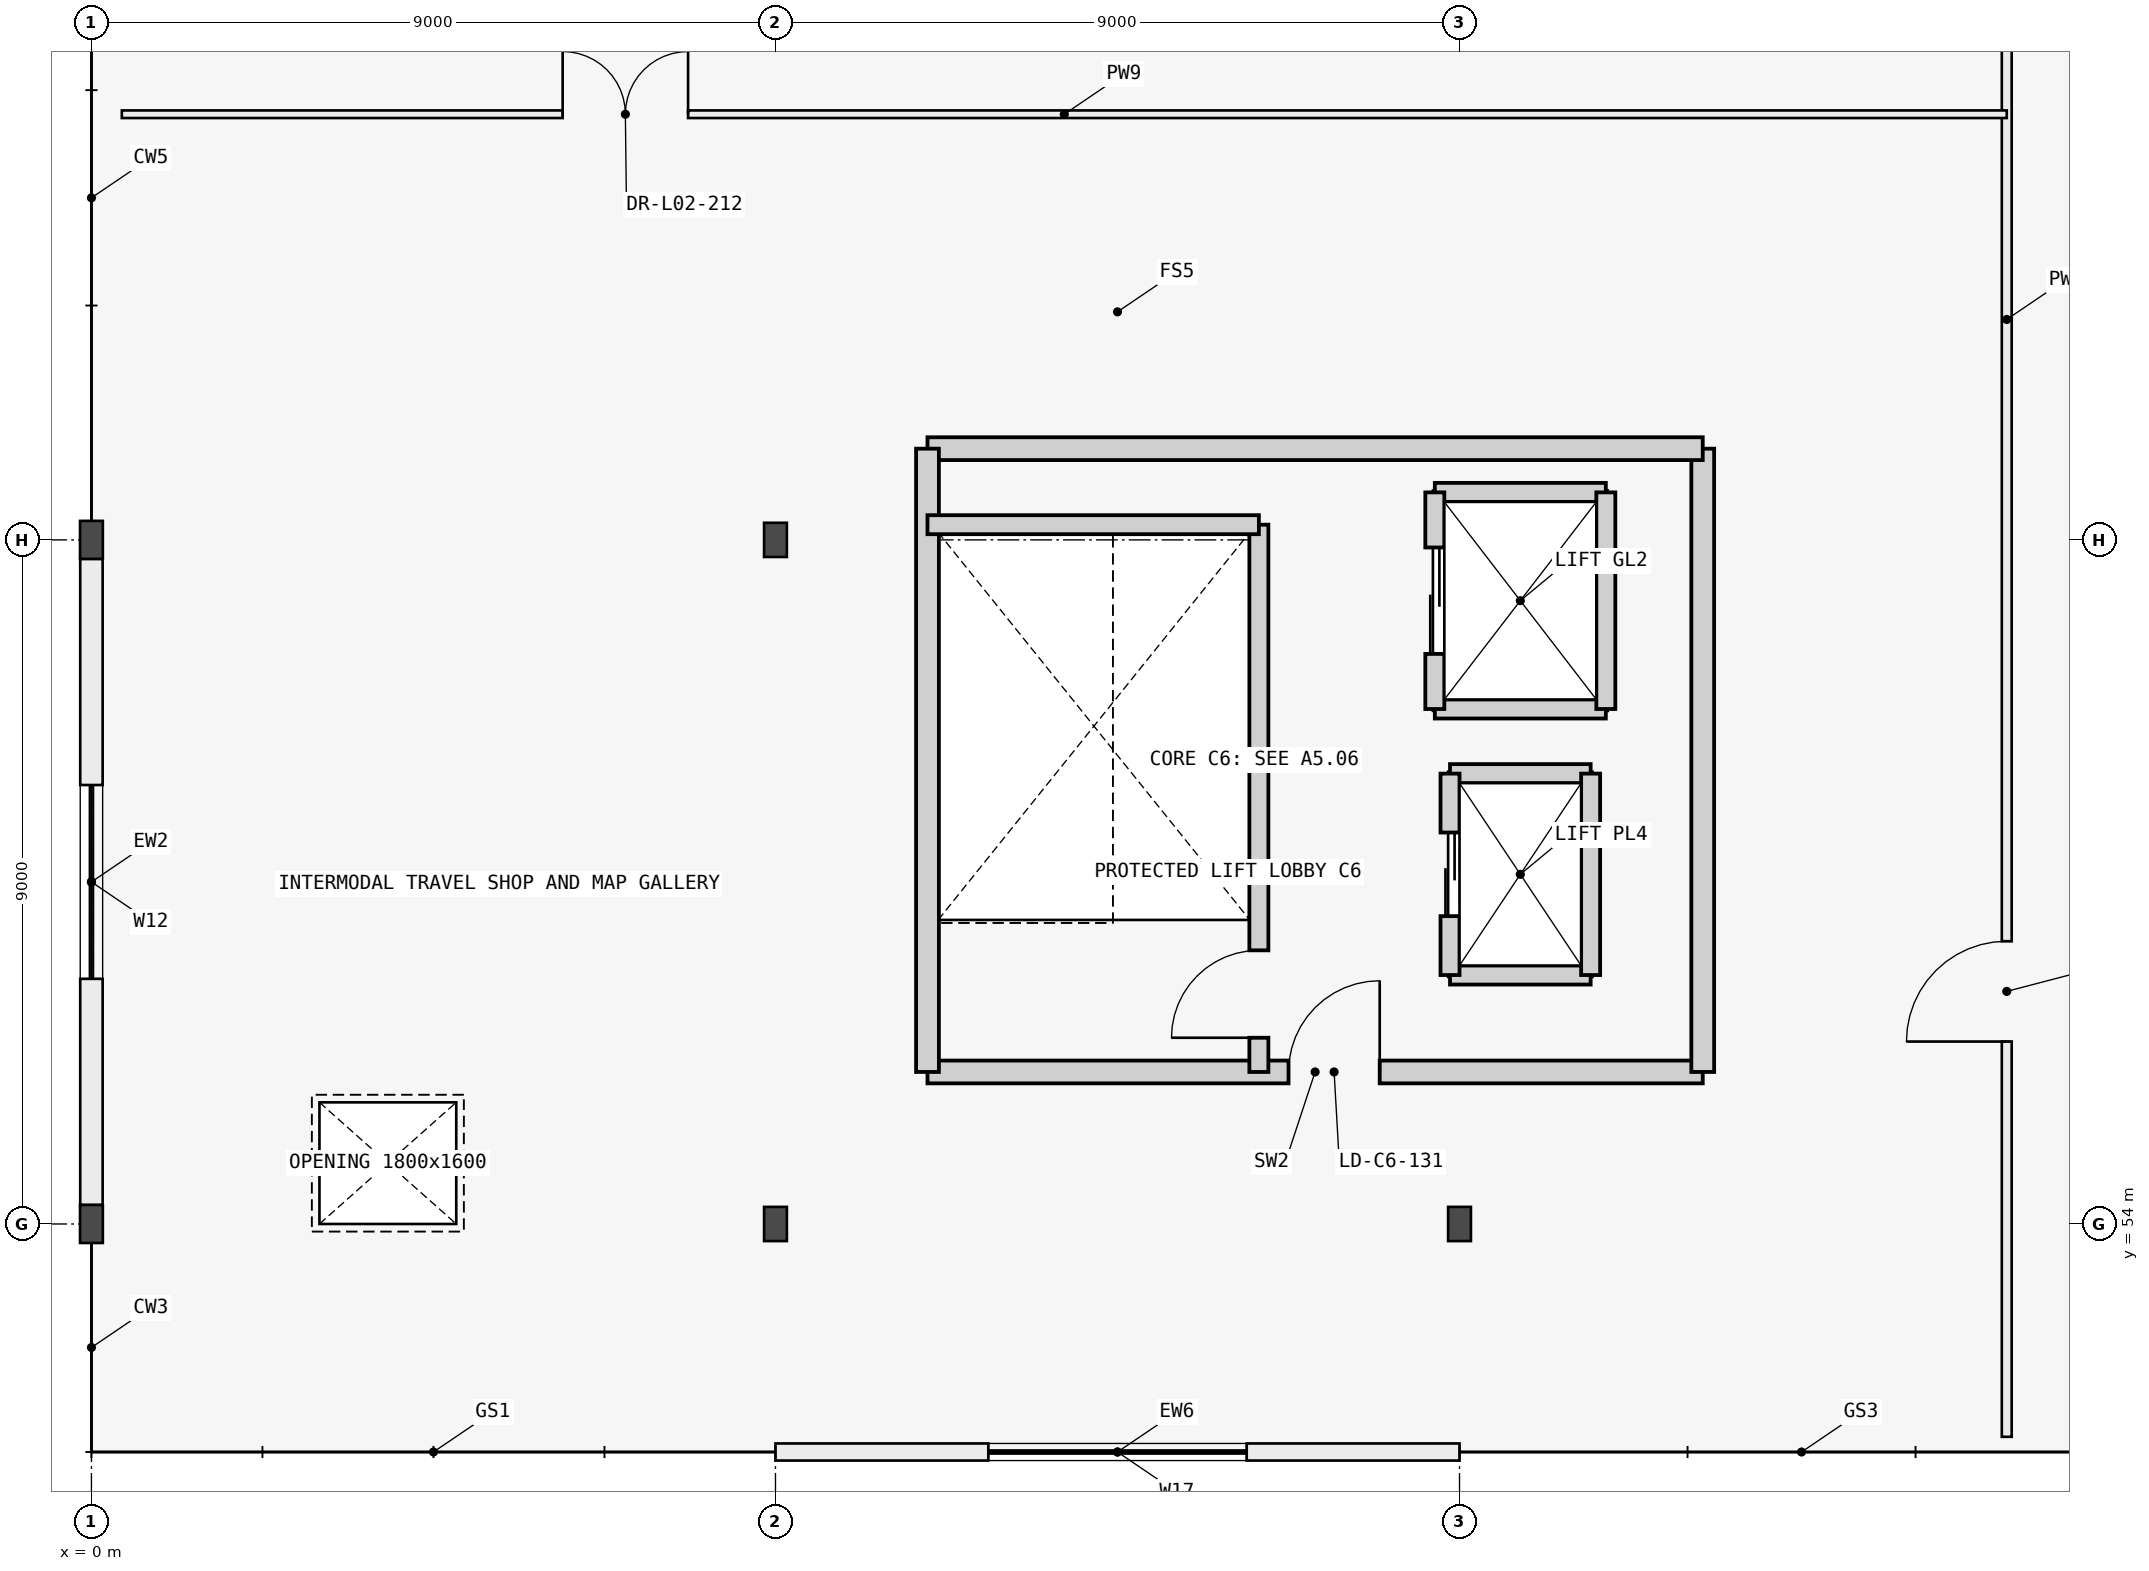
"""IFC4 building model, lengths in metres.
Left out: names, types, materials, properties, quantities, classifications, styles, units other than length and angle.
Written with IfcOpenShell. Run it as: python <this file> out.ifc"""

import sys

from ifc_helpers import new_model, si_unit, direction, frame, frame_2d, origin, origin_2d, place, context, subcontext, project, spatial, rectangle, i_section, extrude, element, fill, save


model = new_model("IFC4")
c1 = context("Model", 3, precision=1e-05, world=origin(), true_north=direction((0.0, 1.0)))
c2 = subcontext(c1, "Body", "Model", "MODEL_VIEW")
j1 = project(units=[si_unit("LENGTHUNIT", "METRE"), si_unit("PLANEANGLEUNIT", "RADIAN")], contexts=[c1])
p1 = place(None, origin())
s1 = spatial("IfcSite", under=j1, at=p1, CompositionType="ELEMENT")
p2 = place(p1, origin())
s2 = spatial("IfcBuilding", under=s1, at=p2, CompositionType="ELEMENT")
p3 = place(p2, frame((0.0, 0.0, 8.4)))
s3 = spatial("IfcBuildingStorey", under=s2, at=p3, CompositionType="ELEMENT", Elevation=8.4)
p4 = place(p3, frame((0.0, 54.0, 0.0), z_axis=(0.0, 0.0, 1.0), x_axis=(1.0, 0.0, 0.0)))
e1 = element("IfcColumn", 1, at=p4, inside=s3, PredefinedType="COLUMN", context=c2, shape_type="SweptSolid", body=[
    extrude(i_section(OverallWidth=0.3, OverallDepth=0.5, WebThickness=0.014, FlangeThickness=0.028, FilletRadius=0.027, at=origin_2d()), origin(), (0.0, 0.0, 1.0), 4.2),
])
for number, where, z_axis, x_axis in (
    (2, (9.0, 54.0, 0.0), (0.0, 0.0, 1.0), (1.0, 0.0, 0.0)),
    (3, (18.0, 54.0, 0.0), (0.0, 0.0, 1.0), (1.0, 0.0, 0.0)),
):
    element("IfcColumn", number, at=place(p3, frame(where, z_axis=z_axis, x_axis=x_axis)), inside=s3, PredefinedType="COLUMN", context=c2, shape_type="SweptSolid", body=[
        extrude(i_section(OverallWidth=0.3, OverallDepth=0.45, WebThickness=0.014, FlangeThickness=0.026, FilletRadius=0.027, at=origin_2d()), origin(), (0.0, 0.0, 1.0), 4.2),
    ])
p5 = place(p3, frame((0.0, 63.0, 0.0), z_axis=(0.0, 0.0, 1.0), x_axis=(1.0, 0.0, 0.0)))
e4 = element("IfcColumn", 4, at=p5, inside=s3, PredefinedType="COLUMN", context=c2, shape_type="SweptSolid", body=[
    extrude(i_section(OverallWidth=0.3, OverallDepth=0.5, WebThickness=0.014, FlangeThickness=0.028, FilletRadius=0.027, at=origin_2d()), origin(), (0.0, 0.0, 1.0), 4.2),
])
p6 = place(p3, frame((9.0, 63.0, 0.0), z_axis=(0.0, 0.0, 1.0), x_axis=(1.0, 0.0, 0.0)))
e5 = element("IfcColumn", 5, at=p6, inside=s3, PredefinedType="COLUMN", context=c2, shape_type="SweptSolid", body=[
    extrude(i_section(OverallWidth=0.3, OverallDepth=0.45, WebThickness=0.014, FlangeThickness=0.026, FilletRadius=0.027, at=origin_2d()), origin(), (0.0, 0.0, 1.0), 4.2),
])
p7 = place(p3, frame((0.0, 54.25, 0.0), z_axis=(0.0, 0.0, 1.0), x_axis=(0.0, 1.0, 0.0)))
e6 = element("IfcWall", 6, at=p7, inside=s3, PredefinedType="STANDARD", context=c2, shape_type="SweptSolid", body=[
    extrude(rectangle(XDim=8.5, YDim=0.295, at=frame_2d((4.25, 0.0))), origin(), (0.0, 0.0, 1.0), 3.935),
])
p8 = place(p7, frame((2.975, 0.0, 0.95)))
e7 = element("IfcOpeningElement", 7, at=p8, cuts=e6, PredefinedType="OPENING", context=c2, shape_type="SweptSolid", body=[
    extrude(rectangle(XDim=2.55, YDim=1.5, at=frame_2d((1.275, 0.75))), frame((0.0, 0.157, 0.0), z_axis=(0.0, -1.0, 0.0), x_axis=(1.0, 0.0, 0.0)), (0.0, 0.0, 1.0), 0.315),
])
p9 = place(p3, frame((9.0, 51.0, 0.0), z_axis=(0.0, 0.0, 1.0), x_axis=(1.0, 0.0, 0.0)))
e8 = element("IfcWall", 8, at=p9, inside=s3, PredefinedType="STANDARD", context=c2, shape_type="SweptSolid", body=[
    extrude(rectangle(XDim=9.0, YDim=0.225, at=frame_2d((4.5, 0.0))), origin(), (0.0, 0.0, 1.0), 3.935),
])
p10 = place(p9, frame((2.8, 0.0, 0.95)))
e9 = element("IfcOpeningElement", 9, at=p10, cuts=e8, PredefinedType="OPENING", context=c2, shape_type="SweptSolid", body=[
    extrude(rectangle(XDim=3.4, YDim=1.55, at=frame_2d((1.7, 0.775))), frame((0.0, 0.123, 0.0), z_axis=(0.0, -1.0, 0.0), x_axis=(1.0, 0.0, 0.0)), (0.0, 0.0, 1.0), 0.245),
])
p11 = place(p3, frame((11.0, 56.0, 0.0), z_axis=(0.0, 0.0, 1.0), x_axis=(1.0, 0.0, 0.0)))
e10 = element("IfcWall", 10, at=p11, inside=s3, PredefinedType="SHEAR", context=c2, shape_type="SweptSolid", body=[
    extrude(rectangle(XDim=10.2, YDim=0.3, at=frame_2d((5.1, 0.0))), origin(), (0.0, 0.0, 1.0), 3.935),
])
p12 = place(p11, frame((4.75, 0.0, 0.0)))
e11 = element("IfcOpeningElement", 11, at=p12, cuts=e10, PredefinedType="OPENING", context=c2, shape_type="SweptSolid", body=[
    extrude(rectangle(XDim=1.2, YDim=2.15, at=frame_2d((0.6, 1.075))), frame((0.0, 0.16, 0.0), z_axis=(0.0, -1.0, 0.0), x_axis=(1.0, 0.0, 0.0)), (0.0, 0.0, 1.0), 0.32),
])
p13 = place(p3, frame((21.2, 56.0, 0.0), z_axis=(0.0, 0.0, 1.0), x_axis=(0.0, 1.0, 0.0)))
e12 = element("IfcWall", 12, at=p13, inside=s3, PredefinedType="SHEAR", context=c2, shape_type="SweptSolid", body=[
    extrude(rectangle(XDim=8.2, YDim=0.3, at=frame_2d((4.1, 0.0))), origin(), (0.0, 0.0, 1.0), 3.935),
])
p14 = place(p3, frame((21.2, 64.2, 0.0), z_axis=(0.0, 0.0, 1.0), x_axis=(-1.0, 0.0, 0.0)))
e13 = element("IfcWall", 13, at=p14, inside=s3, PredefinedType="SHEAR", context=c2, shape_type="SweptSolid", body=[
    extrude(rectangle(XDim=10.2, YDim=0.3, at=frame_2d((5.1, 0.0))), origin(), (0.0, 0.0, 1.0), 3.935),
])
p15 = place(p3, frame((11.0, 64.2, 0.0), z_axis=(0.0, 0.0, 1.0), x_axis=(0.0, -1.0, 0.0)))
e14 = element("IfcWall", 14, at=p15, inside=s3, PredefinedType="SHEAR", context=c2, shape_type="SweptSolid", body=[
    extrude(rectangle(XDim=8.2, YDim=0.3, at=frame_2d((4.1, 0.0))), origin(), (0.0, 0.0, 1.0), 3.935),
])
p16 = place(p3, frame((15.36, 56.0, 0.0), z_axis=(0.0, 0.0, 1.0), x_axis=(0.0, 1.0, 0.0)))
e15 = element("IfcWall", 15, at=p16, inside=s3, PredefinedType="SHEAR", context=c2, shape_type="SweptSolid", body=[
    extrude(rectangle(XDim=7.2, YDim=0.25, at=frame_2d((3.6, 0.0))), origin(), (0.0, 0.0, 1.0), 3.935),
])
p17 = place(p16, frame((0.45, 0.0, 0.0)))
e16 = element("IfcOpeningElement", 16, at=p17, cuts=e15, PredefinedType="OPENING", context=c2, shape_type="SweptSolid", body=[
    extrude(rectangle(XDim=1.15, YDim=2.15, at=frame_2d((0.575, 1.075))), frame((0.0, 0.135, 0.0), z_axis=(0.0, -1.0, 0.0), x_axis=(1.0, 0.0, 0.0)), (0.0, 0.0, 1.0), 0.27),
])
p18 = place(p3, frame((11.0, 63.2, 0.0), z_axis=(0.0, 0.0, 1.0), x_axis=(1.0, 0.0, 0.0)))
e17 = element("IfcWall", 17, at=p18, inside=s3, PredefinedType="SHEAR", context=c2, shape_type="SweptSolid", body=[
    extrude(rectangle(XDim=4.36, YDim=0.25, at=frame_2d((2.18, 0.0))), origin(), (0.0, 0.0, 1.0), 3.935),
])
for number, where, z_axis, x_axis in (
    (18, (17.875, 57.275, 0.0), (0.0, 0.0, 1.0), (1.0, 0.0, 0.0)),
    (19, (17.875, 59.925, 0.0), (0.0, 0.0, 1.0), (1.0, 0.0, 0.0)),
):
    element("IfcWall", number, at=place(p3, frame(where, z_axis=z_axis, x_axis=x_axis)), inside=s3, PredefinedType="SHEAR", context=c2, shape_type="SweptSolid", body=[
        extrude(rectangle(XDim=1.85, YDim=0.25, at=frame_2d((0.925, 0.0))), origin(), (0.0, 0.0, 1.0), 3.935),
    ])
p19 = place(p3, frame((19.725, 57.275, 0.0), z_axis=(0.0, 0.0, 1.0), x_axis=(0.0, 1.0, 0.0)))
e20 = element("IfcWall", 20, at=p19, inside=s3, PredefinedType="SHEAR", context=c2, shape_type="SweptSolid", body=[
    extrude(rectangle(XDim=2.65, YDim=0.25, at=frame_2d((1.325, 0.0))), origin(), (0.0, 0.0, 1.0), 3.935),
])
p20 = place(p3, frame((17.875, 57.275, 0.0), z_axis=(0.0, 0.0, 1.0), x_axis=(0.0, 1.0, 0.0)))
e21 = element("IfcWall", 21, at=p20, inside=s3, PredefinedType="SHEAR", context=c2, shape_type="SweptSolid", body=[
    extrude(rectangle(XDim=2.65, YDim=0.25, at=frame_2d((1.325, 0.0))), origin(), (0.0, 0.0, 1.0), 3.935),
])
p21 = place(p20, frame((0.775, 0.0, 0.0)))
e22 = element("IfcOpeningElement", 22, at=p21, cuts=e21, PredefinedType="OPENING", context=c2, shape_type="SweptSolid", body=[
    extrude(rectangle(XDim=1.1, YDim=2.15, at=frame_2d((0.55, 1.075))), frame((0.0, 0.135, 0.0), z_axis=(0.0, -1.0, 0.0), x_axis=(1.0, 0.0, 0.0)), (0.0, 0.0, 1.0), 0.27),
])
for number, where, z_axis, x_axis in (
    (23, (17.675, 60.775, 0.0), (0.0, 0.0, 1.0), (1.0, 0.0, 0.0)),
    (24, (17.675, 63.625, 0.0), (0.0, 0.0, 1.0), (1.0, 0.0, 0.0)),
):
    element("IfcWall", number, at=place(p3, frame(where, z_axis=z_axis, x_axis=x_axis)), inside=s3, PredefinedType="SHEAR", context=c2, shape_type="SweptSolid", body=[
        extrude(rectangle(XDim=2.25, YDim=0.25, at=frame_2d((1.125, 0.0))), origin(), (0.0, 0.0, 1.0), 3.935),
    ])
p22 = place(p3, frame((19.925, 60.775, 0.0), z_axis=(0.0, 0.0, 1.0), x_axis=(0.0, 1.0, 0.0)))
e25 = element("IfcWall", 25, at=p22, inside=s3, PredefinedType="SHEAR", context=c2, shape_type="SweptSolid", body=[
    extrude(rectangle(XDim=2.85, YDim=0.25, at=frame_2d((1.425, 0.0))), origin(), (0.0, 0.0, 1.0), 3.935),
])
p23 = place(p3, frame((17.675, 60.775, 0.0), z_axis=(0.0, 0.0, 1.0), x_axis=(0.0, 1.0, 0.0)))
e26 = element("IfcWall", 26, at=p23, inside=s3, PredefinedType="SHEAR", context=c2, shape_type="SweptSolid", body=[
    extrude(rectangle(XDim=2.85, YDim=0.25, at=frame_2d((1.425, 0.0))), origin(), (0.0, 0.0, 1.0), 3.935),
])
p24 = place(p23, frame((0.725, 0.0, 0.0)))
e27 = element("IfcOpeningElement", 27, at=p24, cuts=e26, PredefinedType="OPENING", context=c2, shape_type="SweptSolid", body=[
    extrude(rectangle(XDim=1.4, YDim=2.2, at=frame_2d((0.7, 1.1))), frame((0.0, 0.135, 0.0), z_axis=(0.0, -1.0, 0.0), x_axis=(1.0, 0.0, 0.0)), (0.0, 0.0, 1.0), 0.27),
])
p25 = place(p3, frame((25.2, 51.2, 0.0), z_axis=(0.0, 0.0, 1.0), x_axis=(0.0, 1.0, 0.0)))
e28 = element("IfcWall", 28, at=p25, inside=s3, PredefinedType="PARTITIONING", context=c2, shape_type="SweptSolid", body=[
    extrude(rectangle(XDim=29.4, YDim=0.13, at=frame_2d((14.7, 0.0))), origin(), (0.0, 0.0, 1.0), 3.935),
])
p26 = place(p25, frame((5.2, 0.0, 0.0)))
e29 = element("IfcOpeningElement", 29, at=p26, cuts=e28, PredefinedType="OPENING", context=c2, shape_type="SweptSolid", body=[
    extrude(rectangle(XDim=1.32, YDim=2.2, at=frame_2d((0.66, 1.1))), frame((0.0, 0.075, 0.0), z_axis=(0.0, -1.0, 0.0), x_axis=(1.0, 0.0, 0.0)), (0.0, 0.0, 1.0), 0.15),
])
p27 = place(p25, frame((24.5, 0.0, 0.0)))
e30 = element("IfcOpeningElement", 30, at=p27, cuts=e28, PredefinedType="OPENING", context=c2, shape_type="SweptSolid", body=[
    extrude(rectangle(XDim=1.45, YDim=2.22, at=frame_2d((0.725, 1.11))), frame((0.0, 0.075, 0.0), z_axis=(0.0, -1.0, 0.0), x_axis=(1.0, 0.0, 0.0)), (0.0, 0.0, 1.0), 0.15),
])
p28 = place(p3, frame((0.4, 68.6, 0.0), z_axis=(0.0, 0.0, 1.0), x_axis=(1.0, 0.0, 0.0)))
e31 = element("IfcWall", 31, at=p28, inside=s3, PredefinedType="PARTITIONING", context=c2, shape_type="SweptSolid", body=[
    extrude(rectangle(XDim=24.8, YDim=0.1, at=frame_2d((12.4, 0.0))), origin(), (0.0, 0.0, 1.0), 3.935),
])
p29 = place(p28, frame((5.8, 0.0, 0.0)))
e32 = element("IfcOpeningElement", 32, at=p29, cuts=e31, PredefinedType="OPENING", context=c2, shape_type="SweptSolid", body=[
    extrude(rectangle(XDim=1.65, YDim=2.25, at=frame_2d((0.825, 1.125))), frame((0.0, 0.06, 0.0), z_axis=(0.0, -1.0, 0.0), x_axis=(1.0, 0.0, 0.0)), (0.0, 0.0, 1.0), 0.12),
])
p30 = place(p8, origin())
e33 = element("IfcWindow", 33, at=p30, inside=s3, PartitioningType="SINGLE_PANEL", PredefinedType="WINDOW", context=c2, shape_type="SweptSolid", body=[
    extrude(rectangle(XDim=2.55, YDim=1.5, at=frame_2d((1.275, 0.75))), frame((0.0, 0.03, 0.0), z_axis=(0.0, -1.0, 0.0), x_axis=(1.0, 0.0, 0.0)), (0.0, 0.0, 1.0), 0.06),
])
fill(e7, e33)
p31 = place(p10, origin())
e34 = element("IfcWindow", 34, at=p31, inside=s3, PartitioningType="SINGLE_PANEL", PredefinedType="WINDOW", context=c2, shape_type="SweptSolid", body=[
    extrude(rectangle(XDim=3.4, YDim=1.55, at=frame_2d((1.7, 0.775))), frame((0.0, 0.03, 0.0), z_axis=(0.0, -1.0, 0.0), x_axis=(1.0, 0.0, 0.0)), (0.0, 0.0, 1.0), 0.06),
])
fill(e9, e34)
p32 = place(p17, origin())
e35 = element("IfcDoor", 35, at=p32, inside=s3, OperationType="SINGLE_SWING_LEFT", PredefinedType="DOOR", context=c2, shape_type="SweptSolid", body=[
    extrude(rectangle(XDim=1.15, YDim=2.15, at=frame_2d((0.575, 1.075))), frame((0.0, 0.025, 0.0), z_axis=(0.0, -1.0, 0.0), x_axis=(1.0, 0.0, 0.0)), (0.0, 0.0, 1.0), 0.05),
])
fill(e16, e35)
p33 = place(p12, origin())
e36 = element("IfcDoor", 36, at=p33, inside=s3, OperationType="SINGLE_SWING_RIGHT", PredefinedType="DOOR", context=c2, shape_type="SweptSolid", body=[
    extrude(rectangle(XDim=1.2, YDim=2.15, at=frame_2d((0.6, 1.075))), frame((0.0, 0.025, 0.0), z_axis=(0.0, -1.0, 0.0), x_axis=(1.0, 0.0, 0.0)), (0.0, 0.0, 1.0), 0.05),
])
fill(e11, e36)
p34 = place(p21, origin())
e37 = element("IfcDoor", 37, at=p34, inside=s3, OperationType="DOUBLE_DOOR_SLIDING", PredefinedType="USERDEFINED", context=c2, shape_type="SweptSolid", body=[
    extrude(rectangle(XDim=1.1, YDim=2.15, at=frame_2d((0.55, 1.075))), frame((0.0, 0.025, 0.0), z_axis=(0.0, -1.0, 0.0), x_axis=(1.0, 0.0, 0.0)), (0.0, 0.0, 1.0), 0.05),
])
fill(e22, e37)
p35 = place(p24, origin())
e38 = element("IfcDoor", 38, at=p35, inside=s3, OperationType="DOUBLE_DOOR_SLIDING", PredefinedType="USERDEFINED", context=c2, shape_type="SweptSolid", body=[
    extrude(rectangle(XDim=1.4, YDim=2.2, at=frame_2d((0.7, 1.1))), frame((0.0, 0.025, 0.0), z_axis=(0.0, -1.0, 0.0), x_axis=(1.0, 0.0, 0.0)), (0.0, 0.0, 1.0), 0.05),
])
fill(e27, e38)
p36 = place(p26, origin())
e39 = element("IfcDoor", 39, at=p36, inside=s3, OperationType="SINGLE_SWING_LEFT", PredefinedType="DOOR", context=c2, shape_type="SweptSolid", body=[
    extrude(rectangle(XDim=1.32, YDim=2.2, at=frame_2d((0.66, 1.1))), frame((0.0, 0.025, 0.0), z_axis=(0.0, -1.0, 0.0), x_axis=(1.0, 0.0, 0.0)), (0.0, 0.0, 1.0), 0.05),
])
fill(e29, e39)
p37 = place(p29, origin())
e40 = element("IfcDoor", 40, at=p37, inside=s3, OperationType="DOUBLE_DOOR_SINGLE_SWING", PredefinedType="DOOR", context=c2, shape_type="SweptSolid", body=[
    extrude(rectangle(XDim=1.65, YDim=2.25, at=frame_2d((0.825, 1.125))), frame((0.0, 0.025, 0.0), z_axis=(0.0, -1.0, 0.0), x_axis=(1.0, 0.0, 0.0)), (0.0, 0.0, 1.0), 0.05),
])
fill(e32, e40)
save(model, sys.argv[1])
